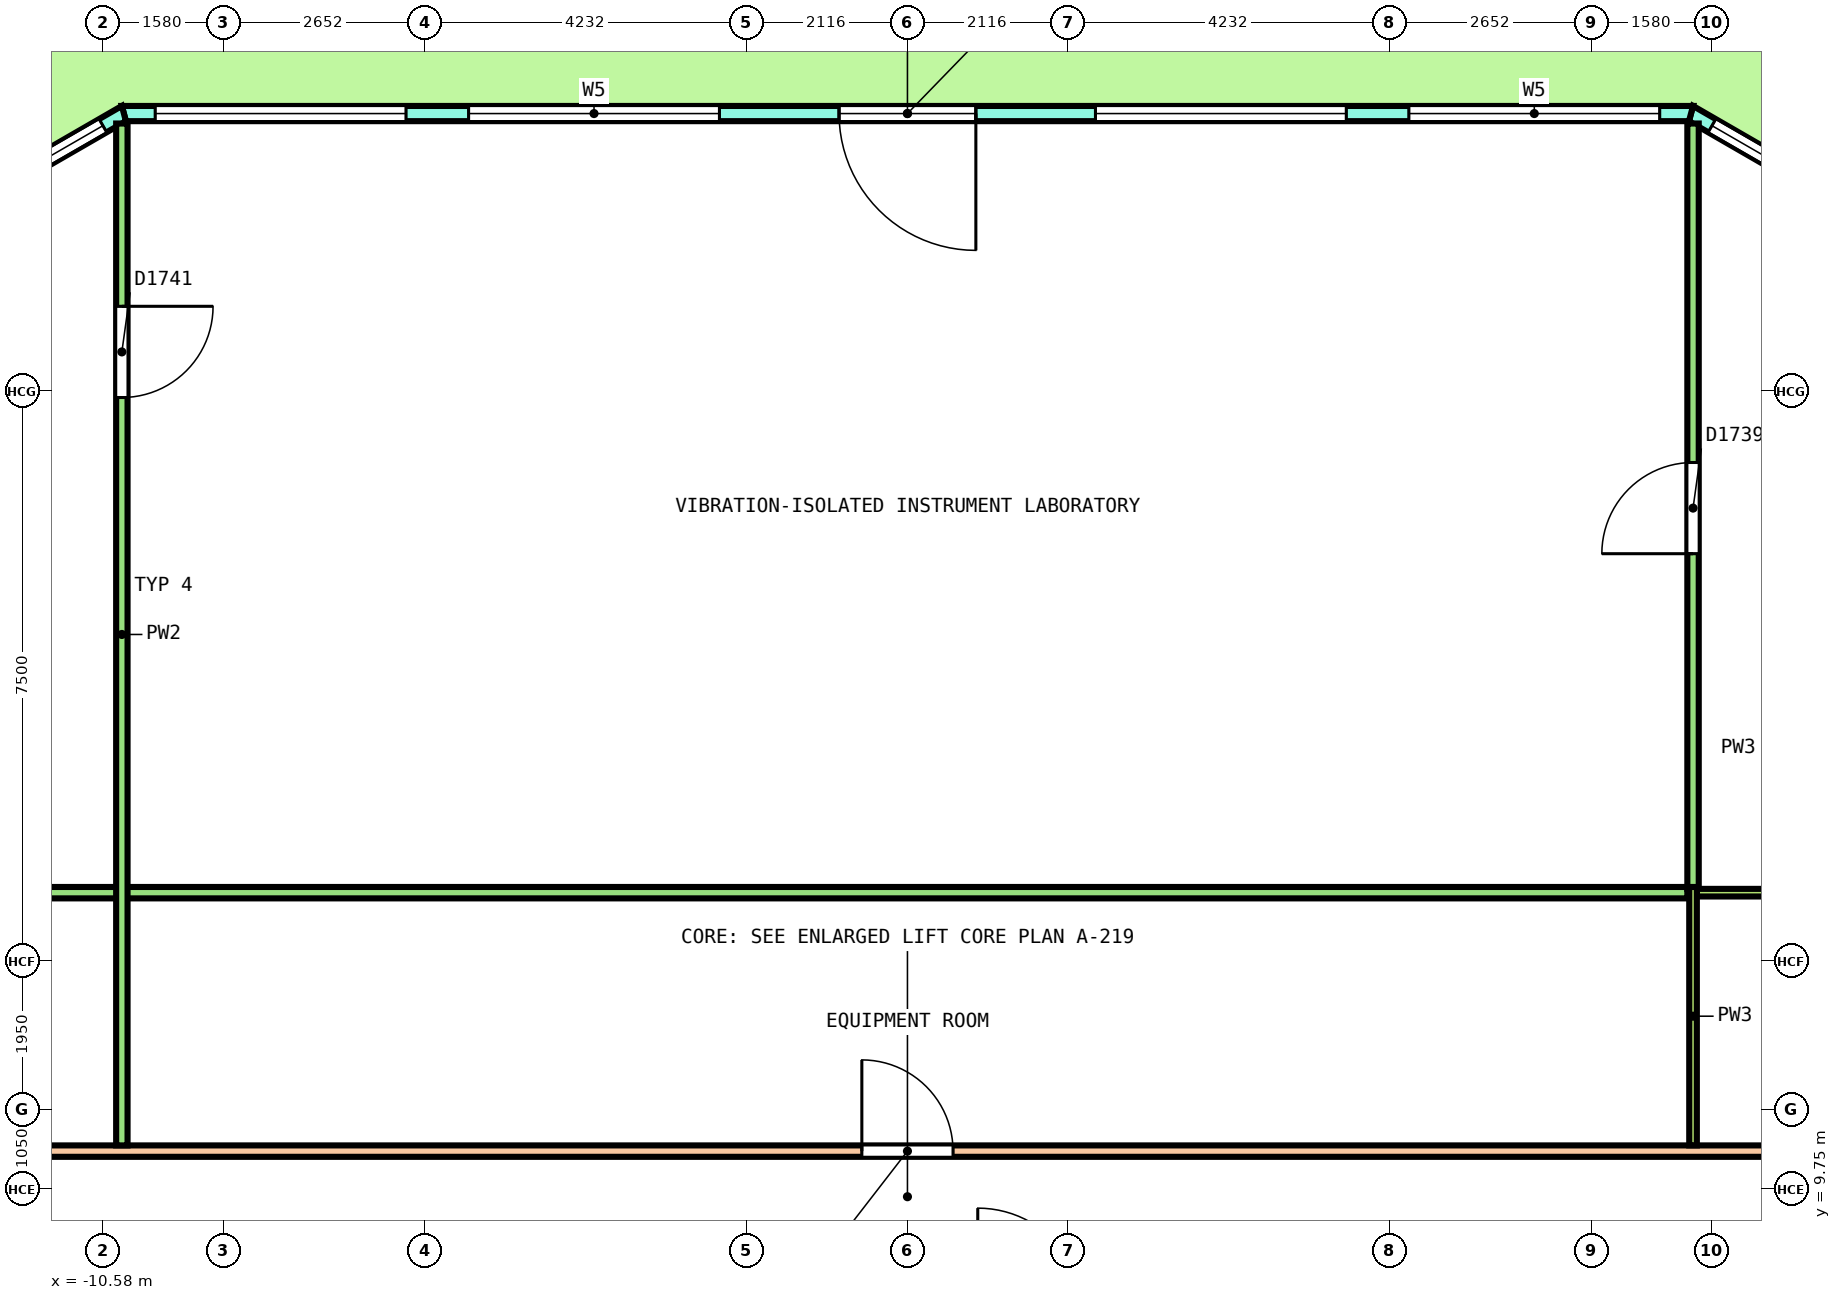
"""IFC4 building model, lengths in metres.
Left out: names, types, materials, properties, quantities, classifications, styles, units other than length and angle.
Written with IfcOpenShell. Run it as: python <this file> out.ifc"""

import sys

from ifc_helpers import new_model, si_unit, direction, frame, frame_2d, origin, place, context, subcontext, project, spatial, polyline, rectangle, outline, extrude, element, fill, save


model = new_model("IFC4")
c1 = context("Model", 3, precision=1e-05, world=origin(), true_north=direction((0.0, 1.0)))
c2 = subcontext(c1, "Body", "Model", "MODEL_VIEW")
j1 = project(units=[si_unit("LENGTHUNIT", "METRE"), si_unit("PLANEANGLEUNIT", "RADIAN")], contexts=[c1])
p1 = place(None, origin())
s1 = spatial("IfcSite", under=j1, at=p1, CompositionType="ELEMENT")
p2 = place(p1, origin())
s2 = spatial("IfcBuilding", under=s1, at=p2, CompositionType="ELEMENT")
p3 = place(p2, frame((0.0, 0.0, 158.4)))
s3 = spatial("IfcBuildingStorey", under=s2, at=p3, CompositionType="ELEMENT", Elevation=158.4)
p4 = place(p3, frame((16.262, 20.463, 0.0), z_axis=(0.0, 0.0, 1.0), x_axis=(-0.866029458321, 0.49999297727, 0.0)))
e1 = element("IfcWall", 1, at=p4, inside=s3, PredefinedType="SOLIDWALL", context=c2, shape_type="SweptSolid", body=[
    extrude(outline(polyline([(-0.027, -0.1), (1.128, -0.1), (2.282, -0.1), (3.437, -0.1), (4.592, -0.1), (5.747, -0.1), (6.901, -0.1), (6.848, 0.1), (5.711, 0.1), (4.574, 0.1), (3.437, 0.1), (2.301, 0.1), (1.164, 0.1), (0.027, 0.1), (-0.027, -0.1)])), origin(), (0.0, 0.0, 1.0), 4.1),
])
p5 = place(p4, frame((0.319, 0.0, 0.1)))
e2 = element("IfcOpeningElement", 2, at=p5, cuts=e1, PredefinedType="OPENING", context=c2, shape_type="SweptSolid", body=[
    extrude(rectangle(XDim=2.8, YDim=2.9, at=frame_2d((1.4, 1.45))), frame((0.0, 0.11, 0.0), z_axis=(0.0, -1.0, 0.0), x_axis=(1.0, 0.0, 0.0)), (0.0, 0.0, 1.0), 0.22),
])
p6 = place(p4, frame((3.756, 0.0, 0.1)))
e3 = element("IfcOpeningElement", 3, at=p6, cuts=e1, PredefinedType="OPENING", context=c2, shape_type="SweptSolid", body=[
    extrude(rectangle(XDim=2.8, YDim=2.9, at=frame_2d((1.4, 1.45))), frame((0.0, 0.11, 0.0), z_axis=(0.0, -1.0, 0.0), x_axis=(1.0, 0.0, 0.0)), (0.0, 0.0, 1.0), 0.22),
])
p7 = place(p3, frame((10.309, 23.9, 0.0), z_axis=(0.0, 0.0, 1.0), x_axis=(-1.0, 0.0, 0.0)))
e4 = element("IfcWall", 4, at=p7, inside=s3, PredefinedType="SOLIDWALL", context=c2, shape_type="SweptSolid", body=[
    extrude(outline(polyline([(-0.027, -0.1), (1.007, -0.1), (2.04, -0.1), (3.074, -0.1), (4.107, -0.1), (5.141, -0.1), (6.174, -0.1), (7.208, -0.1), (8.241, -0.1), (9.275, -0.1), (10.309, -0.1), (11.342, -0.1), (12.376, -0.1), (13.409, -0.1), (14.443, -0.1), (15.476, -0.1), (16.51, -0.1), (17.543, -0.1), (18.577, -0.1), (19.611, -0.1), (20.644, -0.1), (20.59, 0.1), (19.562, 0.1), (18.534, 0.1), (17.506, 0.1), (16.478, 0.1), (15.449, 0.1), (14.421, 0.1), (13.393, 0.1), (12.365, 0.1), (11.337, 0.1), (10.309, 0.1), (9.281, 0.1), (8.252, 0.1), (7.224, 0.1), (6.196, 0.1), (5.168, 0.1), (4.14, 0.1), (3.111, 0.1), (2.083, 0.1), (1.055, 0.1), (0.027, 0.1), (-0.027, -0.1)])), origin(), (0.0, 0.0, 1.0), 4.1),
])
p8 = place(p7, frame((0.412, 0.0, 0.1)))
e5 = element("IfcOpeningElement", 5, at=p8, cuts=e4, PredefinedType="OPENING", context=c2, shape_type="SweptSolid", body=[
    extrude(rectangle(XDim=3.3, YDim=2.9, at=frame_2d((1.65, 1.45))), frame((0.0, 0.11, 0.0), z_axis=(0.0, -1.0, 0.0), x_axis=(1.0, 0.0, 0.0)), (0.0, 0.0, 1.0), 0.22),
])
p9 = place(p7, frame((4.535, 0.0, 0.1)))
e6 = element("IfcOpeningElement", 6, at=p9, cuts=e4, PredefinedType="OPENING", context=c2, shape_type="SweptSolid", body=[
    extrude(rectangle(XDim=3.3, YDim=2.9, at=frame_2d((1.65, 1.45))), frame((0.0, 0.11, 0.0), z_axis=(0.0, -1.0, 0.0), x_axis=(1.0, 0.0, 0.0)), (0.0, 0.0, 1.0), 0.22),
])
p10 = place(p7, frame((9.409, 0.0, 0.0)))
e7 = element("IfcOpeningElement", 7, at=p10, cuts=e4, PredefinedType="OPENING", context=c2, shape_type="SweptSolid", body=[
    extrude(rectangle(XDim=1.8, YDim=2.4, at=frame_2d((0.9, 1.2))), frame((0.0, 0.11, 0.0), z_axis=(0.0, -1.0, 0.0), x_axis=(1.0, 0.0, 0.0)), (0.0, 0.0, 1.0), 0.22),
])
p11 = place(p7, frame((9.409, 0.0, 2.55)))
e8 = element("IfcOpeningElement", 8, at=p11, cuts=e4, PredefinedType="OPENING", context=c2, shape_type="SweptSolid", body=[
    extrude(rectangle(XDim=1.8, YDim=0.45, at=frame_2d((0.9, 0.225))), frame((0.0, 0.11, 0.0), z_axis=(0.0, -1.0, 0.0), x_axis=(1.0, 0.0, 0.0)), (0.0, 0.0, 1.0), 0.22),
])
p12 = place(p7, frame((12.782, 0.0, 0.1)))
e9 = element("IfcOpeningElement", 9, at=p12, cuts=e4, PredefinedType="OPENING", context=c2, shape_type="SweptSolid", body=[
    extrude(rectangle(XDim=3.3, YDim=2.9, at=frame_2d((1.65, 1.45))), frame((0.0, 0.11, 0.0), z_axis=(0.0, -1.0, 0.0), x_axis=(1.0, 0.0, 0.0)), (0.0, 0.0, 1.0), 0.22),
])
p13 = place(p7, frame((16.906, 0.0, 0.1)))
e10 = element("IfcOpeningElement", 10, at=p13, cuts=e4, PredefinedType="OPENING", context=c2, shape_type="SweptSolid", body=[
    extrude(rectangle(XDim=3.3, YDim=2.9, at=frame_2d((1.65, 1.45))), frame((0.0, 0.11, 0.0), z_axis=(0.0, -1.0, 0.0), x_axis=(1.0, 0.0, 0.0)), (0.0, 0.0, 1.0), 0.22),
])
p14 = place(p3, frame((-10.309, 23.9, 0.0), z_axis=(0.0, 0.0, 1.0), x_axis=(-0.866029458321, -0.49999297727, 0.0)))
e11 = element("IfcWall", 11, at=p14, inside=s3, PredefinedType="SOLIDWALL", context=c2, shape_type="SweptSolid", body=[
    extrude(outline(polyline([(-0.027, -0.1), (1.128, -0.1), (2.282, -0.1), (3.437, -0.1), (4.592, -0.1), (5.747, -0.1), (6.901, -0.1), (6.848, 0.1), (5.711, 0.1), (4.574, 0.1), (3.437, 0.1), (2.301, 0.1), (1.164, 0.1), (0.027, 0.1), (-0.027, -0.1)])), origin(), (0.0, 0.0, 1.0), 4.1),
])
p15 = place(p14, frame((0.319, 0.0, 0.1)))
e12 = element("IfcOpeningElement", 12, at=p15, cuts=e11, PredefinedType="OPENING", context=c2, shape_type="SweptSolid", body=[
    extrude(rectangle(XDim=2.8, YDim=2.9, at=frame_2d((1.4, 1.45))), frame((0.0, 0.11, 0.0), z_axis=(0.0, -1.0, 0.0), x_axis=(1.0, 0.0, 0.0)), (0.0, 0.0, 1.0), 0.22),
])
p16 = place(p14, frame((3.756, 0.0, 0.1)))
e13 = element("IfcOpeningElement", 13, at=p16, cuts=e11, PredefinedType="OPENING", context=c2, shape_type="SweptSolid", body=[
    extrude(rectangle(XDim=2.8, YDim=2.9, at=frame_2d((1.4, 1.45))), frame((0.0, 0.11, 0.0), z_axis=(0.0, -1.0, 0.0), x_axis=(1.0, 0.0, 0.0)), (0.0, 0.0, 1.0), 0.22),
])
p17 = place(p3, frame((-15.275, 10.25, 0.0), z_axis=(0.0, 0.0, 1.0), x_axis=(1.0, 0.0, 0.0)))
e14 = element("IfcWall", 14, at=p17, inside=s3, PredefinedType="PARTITIONING", context=c2, shape_type="SweptSolid", body=[
    extrude(rectangle(XDim=30.55, YDim=0.15, at=frame_2d((15.275, 0.0))), origin(), (0.0, 0.0, 1.0), 3.05),
])
p18 = place(p17, frame((26.789, 0.0, 0.0)))
e15 = element("IfcOpeningElement", 15, at=p18, cuts=e14, PredefinedType="OPENING", context=c2, shape_type="SweptSolid", body=[
    extrude(rectangle(XDim=1.0, YDim=2.1, at=frame_2d((0.5, 1.05))), frame((0.0, 0.085, 0.0), z_axis=(0.0, -1.0, 0.0), x_axis=(1.0, 0.0, 0.0)), (0.0, 0.0, 1.0), 0.17),
])
p19 = place(p17, frame((14.675, 0.0, 0.0)))
e16 = element("IfcOpeningElement", 16, at=p19, cuts=e14, PredefinedType="OPENING", context=c2, shape_type="SweptSolid", body=[
    extrude(rectangle(XDim=1.2, YDim=2.1, at=frame_2d((0.6, 1.05))), frame((0.0, 0.085, 0.0), z_axis=(0.0, -1.0, 0.0), x_axis=(1.0, 0.0, 0.0)), (0.0, 0.0, 1.0), 0.17),
])
p20 = place(p17, frame((2.429, 0.0, 0.0)))
e17 = element("IfcOpeningElement", 17, at=p20, cuts=e14, PredefinedType="OPENING", context=c2, shape_type="SweptSolid", body=[
    extrude(rectangle(XDim=1.0, YDim=2.1, at=frame_2d((0.5, 1.05))), frame((0.0, 0.085, 0.0), z_axis=(0.0, -1.0, 0.0), x_axis=(1.0, 0.0, 0.0)), (0.0, 0.0, 1.0), 0.17),
])
p21 = place(p3, frame((-16.697, 13.65, 0.0), z_axis=(0.0, 0.0, 1.0), x_axis=(1.0, 0.0, 0.0)))
e18 = element("IfcWall", 18, at=p21, inside=s3, PredefinedType="PARTITIONING", context=c2, shape_type="SweptSolid", body=[
    extrude(rectangle(XDim=26.958, YDim=0.15, at=frame_2d((13.479, 0.0))), origin(), (0.0, 0.0, 1.0), 3.05),
])
p22 = place(p3, frame((10.335, 13.7, 0.0), z_axis=(0.0, 0.0, 1.0), x_axis=(0.0, 1.0, 0.0)))
e19 = element("IfcWall", 19, at=p22, inside=s3, PredefinedType="PARTITIONING", context=c2, shape_type="SweptSolid", body=[
    extrude(rectangle(XDim=10.069, YDim=0.15, at=frame_2d((5.035, 0.0))), origin(), (0.0, 0.0, 1.0), 3.05),
])
p23 = place(p22, frame((4.409, 0.0, 0.0)))
e20 = element("IfcOpeningElement", 20, at=p23, cuts=e19, PredefinedType="OPENING", context=c2, shape_type="SweptSolid", body=[
    extrude(rectangle(XDim=1.2, YDim=2.1, at=frame_2d((0.6, 1.05))), frame((0.0, 0.085, 0.0), z_axis=(0.0, -1.0, 0.0), x_axis=(1.0, 0.0, 0.0)), (0.0, 0.0, 1.0), 0.17),
])
p24 = place(p3, frame((-10.335, 10.325, 0.0), z_axis=(0.0, 0.0, 1.0), x_axis=(0.0, 1.0, 0.0)))
e21 = element("IfcWall", 21, at=p24, inside=s3, PredefinedType="PARTITIONING", context=c2, shape_type="SweptSolid", body=[
    extrude(rectangle(XDim=13.444, YDim=0.15, at=frame_2d((6.722, 0.0))), origin(), (0.0, 0.0, 1.0), 3.05),
])
p25 = place(p24, frame((9.839, 0.0, 0.0)))
e22 = element("IfcOpeningElement", 22, at=p25, cuts=e21, PredefinedType="OPENING", context=c2, shape_type="SweptSolid", body=[
    extrude(rectangle(XDim=1.2, YDim=2.1, at=frame_2d((0.6, 1.05))), frame((0.0, 0.085, 0.0), z_axis=(0.0, -1.0, 0.0), x_axis=(1.0, 0.0, 0.0)), (0.0, 0.0, 1.0), 0.17),
])
p26 = place(p3, frame((10.385, 13.65, 0.0), z_axis=(0.0, 0.0, 1.0), x_axis=(1.0, 0.0, 0.0)))
e23 = element("IfcWall", 23, at=p26, inside=s3, PredefinedType="PARTITIONING", context=c2, shape_type="SweptSolid", body=[
    extrude(rectangle(XDim=5.215, YDim=0.1, at=frame_2d((2.607, 0.0))), origin(), (0.0, 0.0, 1.0), 3.05),
])
p27 = place(p26, frame((2.666, 0.0, 0.0)))
e24 = element("IfcOpeningElement", 24, at=p27, cuts=e23, PredefinedType="OPENING", context=c2, shape_type="SweptSolid", body=[
    extrude(rectangle(XDim=1.0, YDim=2.1, at=frame_2d((0.5, 1.05))), frame((0.0, 0.06, 0.0), z_axis=(0.0, -1.0, 0.0), x_axis=(1.0, 0.0, 0.0)), (0.0, 0.0, 1.0), 0.12),
])
p28 = place(p3, frame((10.335, 10.325, 0.0), z_axis=(0.0, 0.0, 1.0), x_axis=(0.0, 1.0, 0.0)))
e25 = element("IfcWall", 25, at=p28, inside=s3, PredefinedType="PARTITIONING", context=c2, shape_type="SweptSolid", body=[
    extrude(rectangle(XDim=3.4, YDim=0.1, at=frame_2d((1.7, 0.0))), origin(), (0.0, 0.0, 1.0), 3.05),
])
p29 = place(p6, origin())
e26 = element("IfcWindow", 26, at=p29, inside=s3, PartitioningType="SINGLE_PANEL", PredefinedType="WINDOW", context=c2, shape_type="SweptSolid", body=[
    extrude(rectangle(XDim=2.8, YDim=2.9, at=frame_2d((1.4, 1.45))), frame((0.0, 0.03, 0.0), z_axis=(0.0, -1.0, 0.0), x_axis=(1.0, 0.0, 0.0)), (0.0, 0.0, 1.0), 0.06),
])
fill(e3, e26)
p30 = place(p8, origin())
e27 = element("IfcWindow", 27, at=p30, inside=s3, PartitioningType="SINGLE_PANEL", PredefinedType="WINDOW", context=c2, shape_type="SweptSolid", body=[
    extrude(rectangle(XDim=3.3, YDim=2.9, at=frame_2d((1.65, 1.45))), frame((0.0, 0.03, 0.0), z_axis=(0.0, -1.0, 0.0), x_axis=(1.0, 0.0, 0.0)), (0.0, 0.0, 1.0), 0.06),
])
fill(e5, e27)
p31 = place(p9, origin())
e28 = element("IfcWindow", 28, at=p31, inside=s3, PartitioningType="SINGLE_PANEL", PredefinedType="WINDOW", context=c2, shape_type="SweptSolid", body=[
    extrude(rectangle(XDim=3.3, YDim=2.9, at=frame_2d((1.65, 1.45))), frame((0.0, 0.03, 0.0), z_axis=(0.0, -1.0, 0.0), x_axis=(1.0, 0.0, 0.0)), (0.0, 0.0, 1.0), 0.06),
])
fill(e6, e28)
p32 = place(p10, origin())
e29 = element("IfcDoor", 29, at=p32, inside=s3, OperationType="DOUBLE_DOOR_SINGLE_SWING", PredefinedType="DOOR", context=c2, shape_type="SweptSolid", body=[
    extrude(rectangle(XDim=1.8, YDim=2.4, at=frame_2d((0.9, 1.2))), frame((0.0, 0.025, 0.0), z_axis=(0.0, -1.0, 0.0), x_axis=(1.0, 0.0, 0.0)), (0.0, 0.0, 1.0), 0.05),
])
fill(e7, e29)
p33 = place(p11, origin())
e30 = element("IfcWindow", 30, at=p33, inside=s3, PartitioningType="SINGLE_PANEL", PredefinedType="WINDOW", context=c2, shape_type="SweptSolid", body=[
    extrude(rectangle(XDim=1.8, YDim=0.45, at=frame_2d((0.9, 0.225))), frame((0.0, 0.03, 0.0), z_axis=(0.0, -1.0, 0.0), x_axis=(1.0, 0.0, 0.0)), (0.0, 0.0, 1.0), 0.06),
])
fill(e8, e30)
p34 = place(p12, origin())
e31 = element("IfcWindow", 31, at=p34, inside=s3, PartitioningType="SINGLE_PANEL", PredefinedType="WINDOW", context=c2, shape_type="SweptSolid", body=[
    extrude(rectangle(XDim=3.3, YDim=2.9, at=frame_2d((1.65, 1.45))), frame((0.0, 0.03, 0.0), z_axis=(0.0, -1.0, 0.0), x_axis=(1.0, 0.0, 0.0)), (0.0, 0.0, 1.0), 0.06),
])
fill(e9, e31)
p35 = place(p13, origin())
e32 = element("IfcWindow", 32, at=p35, inside=s3, PartitioningType="SINGLE_PANEL", PredefinedType="WINDOW", context=c2, shape_type="SweptSolid", body=[
    extrude(rectangle(XDim=3.3, YDim=2.9, at=frame_2d((1.65, 1.45))), frame((0.0, 0.03, 0.0), z_axis=(0.0, -1.0, 0.0), x_axis=(1.0, 0.0, 0.0)), (0.0, 0.0, 1.0), 0.06),
])
fill(e10, e32)
p36 = place(p15, origin())
e33 = element("IfcWindow", 33, at=p36, inside=s3, PartitioningType="SINGLE_PANEL", PredefinedType="WINDOW", context=c2, shape_type="SweptSolid", body=[
    extrude(rectangle(XDim=2.8, YDim=2.9, at=frame_2d((1.4, 1.45))), frame((0.0, 0.03, 0.0), z_axis=(0.0, -1.0, 0.0), x_axis=(1.0, 0.0, 0.0)), (0.0, 0.0, 1.0), 0.06),
])
fill(e12, e33)
p37 = place(p23, origin())
e34 = element("IfcDoor", 34, at=p37, inside=s3, OperationType="DOUBLE_DOOR_SINGLE_SWING", PredefinedType="DOOR", context=c2, shape_type="SweptSolid", body=[
    extrude(rectangle(XDim=1.2, YDim=2.1, at=frame_2d((0.6, 1.05))), frame((0.0, 0.025, 0.0), z_axis=(0.0, -1.0, 0.0), x_axis=(1.0, 0.0, 0.0)), (0.0, 0.0, 1.0), 0.05),
])
fill(e20, e34)
p38 = place(p19, origin())
e35 = element("IfcDoor", 35, at=p38, inside=s3, OperationType="DOUBLE_DOOR_SINGLE_SWING", PredefinedType="DOOR", context=c2, shape_type="SweptSolid", body=[
    extrude(rectangle(XDim=1.2, YDim=2.1, at=frame_2d((0.6, 1.05))), frame((0.0, 0.025, 0.0), z_axis=(0.0, -1.0, 0.0), x_axis=(1.0, 0.0, 0.0)), (0.0, 0.0, 1.0), 0.05),
])
fill(e16, e35)
p39 = place(p25, origin())
e36 = element("IfcDoor", 36, at=p39, inside=s3, OperationType="DOUBLE_DOOR_SINGLE_SWING", PredefinedType="DOOR", context=c2, shape_type="SweptSolid", body=[
    extrude(rectangle(XDim=1.2, YDim=2.1, at=frame_2d((0.6, 1.05))), frame((0.0, 0.025, 0.0), z_axis=(0.0, -1.0, 0.0), x_axis=(1.0, 0.0, 0.0)), (0.0, 0.0, 1.0), 0.05),
])
fill(e22, e36)
save(model, sys.argv[1])
